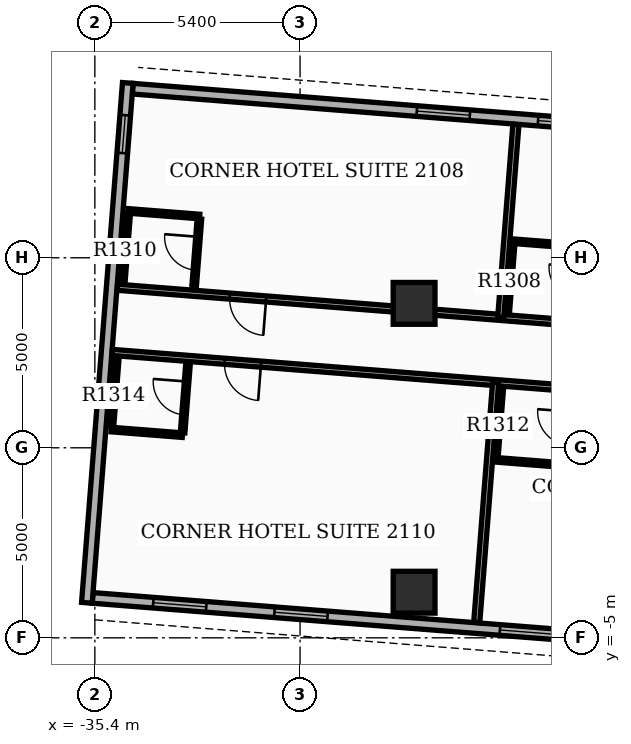
"""IFC4 building model, lengths in metres.
Left out: names, types, materials, properties, quantities, classifications, styles, units other than length and angle.
Written with IfcOpenShell. Run it as: python <this file> out.ifc"""

import sys

from ifc_helpers import new_model, si_unit, direction, frame, frame_2d, origin, origin_2d, place, context, subcontext, project, spatial, rectangle, extrude, element, fill, save


model = new_model("IFC4")
c1 = context("Model", 3, precision=1e-05, world=origin(), true_north=direction((0.0, 1.0)))
c2 = subcontext(c1, "Body", "Model", "MODEL_VIEW")
j1 = project(units=[si_unit("LENGTHUNIT", "METRE"), si_unit("PLANEANGLEUNIT", "RADIAN")], contexts=[c1])
p1 = place(None, origin())
s1 = spatial("IfcSite", under=j1, at=p1, CompositionType="ELEMENT")
p2 = place(p1, origin())
s2 = spatial("IfcBuilding", under=s1, at=p2, CompositionType="ELEMENT")
p3 = place(p2, frame((0.0, 0.0, 83.4)))
s3 = spatial("IfcBuildingStorey", under=s2, at=p3, CompositionType="ELEMENT", Elevation=83.4)
for number, where, z_axis, x_axis in (
    (1, (-27.0, -3.8, 0.0), (0.0, 0.0, 1.0), (1.0, 0.0, 0.0)),
    (2, (-27.0, 3.8, 0.0), (0.0, 0.0, 1.0), (1.0, 0.0, 0.0)),
):
    element("IfcColumn", number, at=place(p3, frame(where, z_axis=z_axis, x_axis=x_axis)), inside=s3, PredefinedType="COLUMN", context=c2, shape_type="SweptSolid", body=[
        extrude(rectangle(XDim=1.1, YDim=1.1, at=origin_2d()), origin(), (0.0, 0.0, 1.0), 3.9),
    ])
p4 = place(p3, frame((-14.367, 7.872, 0.0), z_axis=(0.0, 0.0, 1.0), x_axis=(-0.996917828963, 0.078452802979, 0.0)))
e3 = element("IfcWall", 3, at=p4, inside=s3, PredefinedType="STANDARD", context=c2, shape_type="SweptSolid", body=[
    extrude(rectangle(XDim=20.1, YDim=0.28, at=frame_2d((10.05, 0.0))), origin(), (0.0, 0.0, 1.0), 2.91),
])
p5 = place(p4, frame((1.6, 0.0, 0.8)))
e4 = element("IfcOpeningElement", 4, at=p5, cuts=e3, PredefinedType="OPENING", context=c2, shape_type="SweptSolid", body=[
    extrude(rectangle(XDim=1.4, YDim=1.6, at=frame_2d((0.7, 0.8))), frame((0.0, 0.15, 0.0), z_axis=(0.0, -1.0, 0.0), x_axis=(1.0, 0.0, 0.0)), (0.0, 0.0, 1.0), 0.3),
])
p6 = place(p4, frame((4.8, 0.0, 0.8)))
e5 = element("IfcOpeningElement", 5, at=p6, cuts=e3, PredefinedType="OPENING", context=c2, shape_type="SweptSolid", body=[
    extrude(rectangle(XDim=1.4, YDim=1.6, at=frame_2d((0.7, 0.8))), frame((0.0, 0.15, 0.0), z_axis=(0.0, -1.0, 0.0), x_axis=(1.0, 0.0, 0.0)), (0.0, 0.0, 1.0), 0.3),
])
p7 = place(p4, frame((8.0, 0.0, 0.8)))
e6 = element("IfcOpeningElement", 6, at=p7, cuts=e3, PredefinedType="OPENING", context=c2, shape_type="SweptSolid", body=[
    extrude(rectangle(XDim=1.4, YDim=1.6, at=frame_2d((0.7, 0.8))), frame((0.0, 0.15, 0.0), z_axis=(0.0, -1.0, 0.0), x_axis=(1.0, 0.0, 0.0)), (0.0, 0.0, 1.0), 0.3),
])
p8 = place(p4, frame((11.2, 0.0, 0.8)))
e7 = element("IfcOpeningElement", 7, at=p8, cuts=e3, PredefinedType="OPENING", context=c2, shape_type="SweptSolid", body=[
    extrude(rectangle(XDim=1.4, YDim=1.6, at=frame_2d((0.7, 0.8))), frame((0.0, 0.15, 0.0), z_axis=(0.0, -1.0, 0.0), x_axis=(1.0, 0.0, 0.0)), (0.0, 0.0, 1.0), 0.3),
])
p9 = place(p3, frame((-35.459, -3.95, 0.0), z_axis=(0.0, 0.0, 1.0), x_axis=(0.996917828963, -0.078452802979, 0.0)))
e8 = element("IfcWall", 8, at=p9, inside=s3, PredefinedType="STANDARD", context=c2, shape_type="SweptSolid", body=[
    extrude(rectangle(XDim=20.1, YDim=0.28, at=frame_2d((10.05, 0.0))), origin(), (0.0, 0.0, 1.0), 2.91),
])
p10 = place(p9, frame((1.6, 0.0, 0.8)))
e9 = element("IfcOpeningElement", 9, at=p10, cuts=e8, PredefinedType="OPENING", context=c2, shape_type="SweptSolid", body=[
    extrude(rectangle(XDim=1.4, YDim=1.6, at=frame_2d((0.7, 0.8))), frame((0.0, 0.15, 0.0), z_axis=(0.0, -1.0, 0.0), x_axis=(1.0, 0.0, 0.0)), (0.0, 0.0, 1.0), 0.3),
])
p11 = place(p9, frame((4.8, 0.0, 0.8)))
e10 = element("IfcOpeningElement", 10, at=p11, cuts=e8, PredefinedType="OPENING", context=c2, shape_type="SweptSolid", body=[
    extrude(rectangle(XDim=1.4, YDim=1.6, at=frame_2d((0.7, 0.8))), frame((0.0, 0.15, 0.0), z_axis=(0.0, -1.0, 0.0), x_axis=(1.0, 0.0, 0.0)), (0.0, 0.0, 1.0), 0.3),
])
p12 = place(p9, frame((10.75, 0.0, 0.8)))
e11 = element("IfcOpeningElement", 11, at=p12, cuts=e8, PredefinedType="OPENING", context=c2, shape_type="SweptSolid", body=[
    extrude(rectangle(XDim=1.4, YDim=1.6, at=frame_2d((0.7, 0.8))), frame((0.0, 0.15, 0.0), z_axis=(0.0, -1.0, 0.0), x_axis=(1.0, 0.0, 0.0)), (0.0, 0.0, 1.0), 0.3),
])
p13 = place(p9, frame((13.95, 0.0, 0.8)))
e12 = element("IfcOpeningElement", 12, at=p13, cuts=e8, PredefinedType="OPENING", context=c2, shape_type="SweptSolid", body=[
    extrude(rectangle(XDim=1.4, YDim=1.6, at=frame_2d((0.7, 0.8))), frame((0.0, 0.15, 0.0), z_axis=(0.0, -1.0, 0.0), x_axis=(1.0, 0.0, 0.0)), (0.0, 0.0, 1.0), 0.3),
])
p14 = place(p3, frame((-34.533, 9.599, 0.0), z_axis=(0.0, 0.0, 1.0), x_axis=(-0.078473519122, -0.996916198482, 0.0)))
e13 = element("IfcWall", 13, at=p14, inside=s3, PredefinedType="STANDARD", context=c2, shape_type="SweptSolid", body=[
    extrude(rectangle(XDim=13.72, YDim=0.28, at=frame_2d((6.86, 0.0))), origin(), (0.0, 0.0, 1.0), 2.91),
])
p15 = place(p14, frame((0.85, 0.0, 0.85)))
e14 = element("IfcOpeningElement", 14, at=p15, cuts=e13, PredefinedType="OPENING", context=c2, shape_type="SweptSolid", body=[
    extrude(rectangle(XDim=1.0, YDim=1.5, at=frame_2d((0.5, 0.75))), frame((0.0, 0.15, 0.0), z_axis=(0.0, -1.0, 0.0), x_axis=(1.0, 0.0, 0.0)), (0.0, 0.0, 1.0), 0.3),
])
p16 = place(p3, frame((-14.688, 2.641, 0.0), z_axis=(0.0, 0.0, 1.0), x_axis=(-0.996917226209, 0.078460461943, 0.0)))
e15 = element("IfcWall", 15, at=p16, inside=s3, PredefinedType="PARTITIONING", context=c2, shape_type="SweptSolid", body=[
    extrude(rectangle(XDim=20.182, YDim=0.16, at=frame_2d((10.091, 0.0))), origin(), (0.0, 0.0, 1.0), 2.9),
])
p17 = place(p16, frame((0.45, 0.0, 0.0)))
e16 = element("IfcOpeningElement", 16, at=p17, cuts=e15, PredefinedType="OPENING", context=c2, shape_type="SweptSolid", body=[
    extrude(rectangle(XDim=0.96, YDim=2.15, at=frame_2d((0.48, 1.075))), frame((0.0, 0.09, 0.0), z_axis=(0.0, -1.0, 0.0), x_axis=(1.0, 0.0, 0.0)), (0.0, 0.0, 1.0), 0.18),
])
p18 = place(p16, frame((16.255, 0.0, 0.0)))
e17 = element("IfcOpeningElement", 17, at=p18, cuts=e15, PredefinedType="OPENING", context=c2, shape_type="SweptSolid", body=[
    extrude(rectangle(XDim=0.96, YDim=2.15, at=frame_2d((0.48, 1.075))), frame((0.0, 0.09, 0.0), z_axis=(0.0, -1.0, 0.0), x_axis=(1.0, 0.0, 0.0)), (0.0, 0.0, 1.0), 0.18),
])
p19 = place(p3, frame((-24.72, 3.43, 0.0), z_axis=(0.0, 0.0, 1.0), x_axis=(0.078489312313, 0.996914955175, 0.0)))
e18 = element("IfcWall", 18, at=p19, inside=s3, PredefinedType="PARTITIONING", context=c2, shape_type="SweptSolid", body=[
    extrude(rectangle(XDim=5.092, YDim=0.16, at=frame_2d((2.546, 0.0))), origin(), (0.0, 0.0, 1.0), 2.9),
])
p20 = place(p3, frame((-24.55, 3.557, 0.0), z_axis=(0.0, 0.0, 1.0), x_axis=(0.0784709492, 0.996916400774, 0.0)))
e19 = element("IfcWall", 19, at=p20, inside=s3, PredefinedType="PARTITIONING", context=c2, shape_type="SweptSolid", body=[
    extrude(rectangle(XDim=1.82, YDim=0.12, at=frame_2d((0.91, 0.0))), origin(), (0.0, 0.0, 1.0), 2.9),
])
p21 = place(p3, frame((-22.528, 5.289, 0.0), z_axis=(0.0, 0.0, 1.0), x_axis=(-0.99691849475, 0.078444342213, 0.0)))
e20 = element("IfcWall", 20, at=p21, inside=s3, PredefinedType="PARTITIONING", context=c2, shape_type="SweptSolid", body=[
    extrude(rectangle(XDim=1.88, YDim=0.12, at=frame_2d((0.94, 0.0))), origin(), (0.0, 0.0, 1.0), 2.9),
])
p22 = place(p3, frame((-32.791, 4.206, 0.0), z_axis=(0.0, 0.0, 1.0), x_axis=(0.078481444107, 0.996915574626, 0.0)))
e21 = element("IfcWall", 21, at=p22, inside=s3, PredefinedType="PARTITIONING", context=c2, shape_type="SweptSolid", body=[
    extrude(rectangle(XDim=1.82, YDim=0.12, at=frame_2d((0.91, 0.0))), origin(), (0.0, 0.0, 1.0), 2.9),
])
p23 = place(p22, frame((0.47, 0.0, 0.0)))
e22 = element("IfcOpeningElement", 22, at=p23, cuts=e21, PredefinedType="OPENING", context=c2, shape_type="SweptSolid", body=[
    extrude(rectangle(XDim=0.88, YDim=2.1, at=frame_2d((0.44, 1.05))), frame((0.0, 0.07, 0.0), z_axis=(0.0, -1.0, 0.0), x_axis=(1.0, 0.0, 0.0)), (0.0, 0.0, 1.0), 0.14),
])
p24 = place(p3, frame((-34.665, 4.353, 0.0), z_axis=(0.0, 0.0, 1.0), x_axis=(0.078481444107, 0.996915574626, 0.0)))
e23 = element("IfcWall", 23, at=p24, inside=s3, PredefinedType="PARTITIONING", context=c2, shape_type="SweptSolid", body=[
    extrude(rectangle(XDim=1.82, YDim=0.12, at=frame_2d((0.91, 0.0))), origin(), (0.0, 0.0, 1.0), 2.9),
])
p25 = place(p3, frame((-32.643, 6.085, 0.0), z_axis=(0.0, 0.0, 1.0), x_axis=(-0.99691849475, 0.078444342213, 0.0)))
e24 = element("IfcWall", 24, at=p25, inside=s3, PredefinedType="PARTITIONING", context=c2, shape_type="SweptSolid", body=[
    extrude(rectangle(XDim=1.88, YDim=0.12, at=frame_2d((0.94, 0.0))), origin(), (0.0, 0.0, 1.0), 2.9),
])
p26 = place(p3, frame((-14.823, 0.926, 0.0), z_axis=(0.0, 0.0, 1.0), x_axis=(-0.996917226209, 0.078460461943, 0.0)))
e25 = element("IfcWall", 25, at=p26, inside=s3, PredefinedType="PARTITIONING", context=c2, shape_type="SweptSolid", body=[
    extrude(rectangle(XDim=20.182, YDim=0.16, at=frame_2d((10.091, 0.0))), origin(), (0.0, 0.0, 1.0), 2.9),
])
p27 = place(p26, frame((0.45, 0.0, 0.0)))
e26 = element("IfcOpeningElement", 26, at=p27, cuts=e25, PredefinedType="OPENING", context=c2, shape_type="SweptSolid", body=[
    extrude(rectangle(XDim=0.96, YDim=2.15, at=frame_2d((0.48, 1.075))), frame((0.0, 0.09, 0.0), z_axis=(0.0, -1.0, 0.0), x_axis=(1.0, 0.0, 0.0)), (0.0, 0.0, 1.0), 0.18),
])
p28 = place(p26, frame((16.255, 0.0, 0.0)))
e27 = element("IfcOpeningElement", 27, at=p28, cuts=e25, PredefinedType="OPENING", context=c2, shape_type="SweptSolid", body=[
    extrude(rectangle(XDim=0.96, YDim=2.15, at=frame_2d((0.48, 1.075))), frame((0.0, 0.09, 0.0), z_axis=(0.0, -1.0, 0.0), x_axis=(1.0, 0.0, 0.0)), (0.0, 0.0, 1.0), 0.18),
])
p29 = place(p3, frame((-24.855, 1.715, 0.0), z_axis=(0.0, 0.0, 1.0), x_axis=(-0.078462493424, -0.996917066323, 0.0)))
e28 = element("IfcWall", 28, at=p29, inside=s3, PredefinedType="PARTITIONING", context=c2, shape_type="SweptSolid", body=[
    extrude(rectangle(XDim=6.332, YDim=0.16, at=frame_2d((3.166, 0.0))), origin(), (0.0, 0.0, 1.0), 2.9),
])
p30 = place(p3, frame((-24.849, -0.251, 0.0), z_axis=(0.0, 0.0, 1.0), x_axis=(0.0784709492, 0.996916400774, 0.0)))
e29 = element("IfcWall", 29, at=p30, inside=s3, PredefinedType="PARTITIONING", context=c2, shape_type="SweptSolid", body=[
    extrude(rectangle(XDim=1.82, YDim=0.12, at=frame_2d((0.91, 0.0))), origin(), (0.0, 0.0, 1.0), 2.9),
])
p31 = place(p3, frame((-22.98, -0.463, 0.0), z_axis=(0.0, 0.0, 1.0), x_axis=(-0.996919293781, 0.07843418698, 0.0)))
e30 = element("IfcWall", 30, at=p31, inside=s3, PredefinedType="PARTITIONING", context=c2, shape_type="SweptSolid", body=[
    extrude(rectangle(XDim=1.88, YDim=0.12, at=frame_2d((0.94, 0.0))), origin(), (0.0, 0.0, 1.0), 2.9),
])
p32 = place(p3, frame((-33.091, 0.397, 0.0), z_axis=(0.0, 0.0, 1.0), x_axis=(0.0784709492, 0.996916400774, 0.0)))
e31 = element("IfcWall", 31, at=p32, inside=s3, PredefinedType="PARTITIONING", context=c2, shape_type="SweptSolid", body=[
    extrude(rectangle(XDim=1.82, YDim=0.12, at=frame_2d((0.91, 0.0))), origin(), (0.0, 0.0, 1.0), 2.9),
])
p33 = place(p32, frame((0.47, 0.0, 0.0)))
e32 = element("IfcOpeningElement", 32, at=p33, cuts=e31, PredefinedType="OPENING", context=c2, shape_type="SweptSolid", body=[
    extrude(rectangle(XDim=0.88, YDim=2.1, at=frame_2d((0.44, 1.05))), frame((0.0, 0.07, 0.0), z_axis=(0.0, -1.0, 0.0), x_axis=(1.0, 0.0, 0.0)), (0.0, 0.0, 1.0), 0.14),
])
p34 = place(p3, frame((-34.965, 0.545, 0.0), z_axis=(0.0, 0.0, 1.0), x_axis=(0.0784709492, 0.996916400774, 0.0)))
e33 = element("IfcWall", 33, at=p34, inside=s3, PredefinedType="PARTITIONING", context=c2, shape_type="SweptSolid", body=[
    extrude(rectangle(XDim=1.82, YDim=0.12, at=frame_2d((0.91, 0.0))), origin(), (0.0, 0.0, 1.0), 2.9),
])
p35 = place(p3, frame((-33.096, 0.333, 0.0), z_axis=(0.0, 0.0, 1.0), x_axis=(-0.996919293781, 0.07843418698, 0.0)))
e34 = element("IfcWall", 34, at=p35, inside=s3, PredefinedType="PARTITIONING", context=c2, shape_type="SweptSolid", body=[
    extrude(rectangle(XDim=1.88, YDim=0.12, at=frame_2d((0.94, 0.0))), origin(), (0.0, 0.0, 1.0), 2.9),
])
p36 = place(p7, origin())
e35 = element("IfcWindow", 35, at=p36, inside=s3, PartitioningType="SINGLE_PANEL", PredefinedType="WINDOW", context=c2, shape_type="SweptSolid", body=[
    extrude(rectangle(XDim=1.4, YDim=1.6, at=frame_2d((0.7, 0.8))), frame((0.0, 0.03, 0.0), z_axis=(0.0, -1.0, 0.0), x_axis=(1.0, 0.0, 0.0)), (0.0, 0.0, 1.0), 0.06),
])
fill(e6, e35)
p37 = place(p8, origin())
e36 = element("IfcWindow", 36, at=p37, inside=s3, PartitioningType="SINGLE_PANEL", PredefinedType="WINDOW", context=c2, shape_type="SweptSolid", body=[
    extrude(rectangle(XDim=1.4, YDim=1.6, at=frame_2d((0.7, 0.8))), frame((0.0, 0.03, 0.0), z_axis=(0.0, -1.0, 0.0), x_axis=(1.0, 0.0, 0.0)), (0.0, 0.0, 1.0), 0.06),
])
fill(e7, e36)
p38 = place(p10, origin())
e37 = element("IfcWindow", 37, at=p38, inside=s3, PartitioningType="SINGLE_PANEL", PredefinedType="WINDOW", context=c2, shape_type="SweptSolid", body=[
    extrude(rectangle(XDim=1.4, YDim=1.6, at=frame_2d((0.7, 0.8))), frame((0.0, 0.03, 0.0), z_axis=(0.0, -1.0, 0.0), x_axis=(1.0, 0.0, 0.0)), (0.0, 0.0, 1.0), 0.06),
])
fill(e9, e37)
p39 = place(p11, origin())
e38 = element("IfcWindow", 38, at=p39, inside=s3, PartitioningType="SINGLE_PANEL", PredefinedType="WINDOW", context=c2, shape_type="SweptSolid", body=[
    extrude(rectangle(XDim=1.4, YDim=1.6, at=frame_2d((0.7, 0.8))), frame((0.0, 0.03, 0.0), z_axis=(0.0, -1.0, 0.0), x_axis=(1.0, 0.0, 0.0)), (0.0, 0.0, 1.0), 0.06),
])
fill(e10, e38)
p40 = place(p12, origin())
e39 = element("IfcWindow", 39, at=p40, inside=s3, PartitioningType="SINGLE_PANEL", PredefinedType="WINDOW", context=c2, shape_type="SweptSolid", body=[
    extrude(rectangle(XDim=1.4, YDim=1.6, at=frame_2d((0.7, 0.8))), frame((0.0, 0.03, 0.0), z_axis=(0.0, -1.0, 0.0), x_axis=(1.0, 0.0, 0.0)), (0.0, 0.0, 1.0), 0.06),
])
fill(e11, e39)
p41 = place(p15, origin())
e40 = element("IfcWindow", 40, at=p41, inside=s3, PartitioningType="SINGLE_PANEL", PredefinedType="WINDOW", context=c2, shape_type="SweptSolid", body=[
    extrude(rectangle(XDim=1.0, YDim=1.5, at=frame_2d((0.5, 0.75))), frame((0.0, 0.03, 0.0), z_axis=(0.0, -1.0, 0.0), x_axis=(1.0, 0.0, 0.0)), (0.0, 0.0, 1.0), 0.06),
])
fill(e14, e40)
p42 = place(p18, origin())
e41 = element("IfcDoor", 41, at=p42, inside=s3, OperationType="SINGLE_SWING_LEFT", PredefinedType="DOOR", context=c2, shape_type="SweptSolid", body=[
    extrude(rectangle(XDim=0.96, YDim=2.15, at=frame_2d((0.48, 1.075))), frame((0.0, 0.025, 0.0), z_axis=(0.0, -1.0, 0.0), x_axis=(1.0, 0.0, 0.0)), (0.0, 0.0, 1.0), 0.05),
])
fill(e17, e41)
p43 = place(p23, origin())
e42 = element("IfcDoor", 42, at=p43, inside=s3, OperationType="SINGLE_SWING_RIGHT", PredefinedType="DOOR", context=c2, shape_type="SweptSolid", body=[
    extrude(rectangle(XDim=0.88, YDim=2.1, at=frame_2d((0.44, 1.05))), frame((0.0, 0.025, 0.0), z_axis=(0.0, -1.0, 0.0), x_axis=(1.0, 0.0, 0.0)), (0.0, 0.0, 1.0), 0.05),
])
fill(e22, e42)
p44 = place(p28, origin())
e43 = element("IfcDoor", 43, at=p44, inside=s3, OperationType="SINGLE_SWING_LEFT", PredefinedType="DOOR", context=c2, shape_type="SweptSolid", body=[
    extrude(rectangle(XDim=0.96, YDim=2.15, at=frame_2d((0.48, 1.075))), frame((0.0, 0.025, 0.0), z_axis=(0.0, -1.0, 0.0), x_axis=(1.0, 0.0, 0.0)), (0.0, 0.0, 1.0), 0.05),
])
fill(e27, e43)
p45 = place(p33, origin())
e44 = element("IfcDoor", 44, at=p45, inside=s3, OperationType="SINGLE_SWING_RIGHT", PredefinedType="DOOR", context=c2, shape_type="SweptSolid", body=[
    extrude(rectangle(XDim=0.88, YDim=2.1, at=frame_2d((0.44, 1.05))), frame((0.0, 0.025, 0.0), z_axis=(0.0, -1.0, 0.0), x_axis=(1.0, 0.0, 0.0)), (0.0, 0.0, 1.0), 0.05),
])
fill(e32, e44)
save(model, sys.argv[1])
